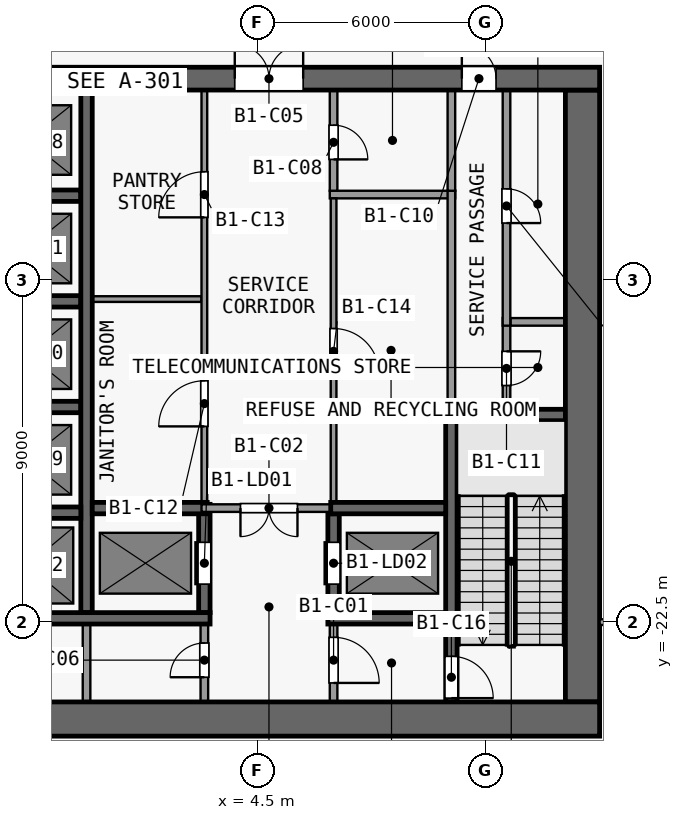
"""IFC4 building model, lengths in metres.
Left out: names, types, materials, properties, quantities, classifications, styles, units other than length and angle.
Written with IfcOpenShell. Run it as: python <this file> out.ifc"""

import sys

from ifc_helpers import new_model, si_unit, direction, frame, frame_2d, origin, place, context, subcontext, project, spatial, rectangle, extrude, element, fill, save


model = new_model("IFC4")
c1 = context("Model", 3, precision=1e-05, world=origin(), true_north=direction((0.0, 1.0)))
c2 = subcontext(c1, "Body", "Model", "MODEL_VIEW")
j1 = project(units=[si_unit("LENGTHUNIT", "METRE"), si_unit("PLANEANGLEUNIT", "RADIAN")], contexts=[c1])
p1 = place(None, origin())
s1 = spatial("IfcSite", under=j1, at=p1, CompositionType="ELEMENT")
p2 = place(p1, origin())
s2 = spatial("IfcBuilding", under=s1, at=p2, CompositionType="ELEMENT")
p3 = place(p2, frame((0.0, 0.0, -5.0)))
s3 = spatial("IfcBuildingStorey", under=s2, at=p3, CompositionType="ELEMENT", Elevation=-5.0)
p4 = place(p3, frame((-13.5, -25.05, 0.0), z_axis=(0.0, 0.0, 1.0), x_axis=(1.0, 0.0, 0.0)))
e1 = element("IfcWall", 1, at=p4, inside=s3, PredefinedType="SHEAR", context=c2, shape_type="SweptSolid", body=[
    extrude(rectangle(XDim=27.0, YDim=0.9, at=frame_2d((13.5, 0.0))), origin(), (0.0, 0.0, 1.0), 4.55),
])
p5 = place(p3, frame((-13.5, -8.2, 0.0), z_axis=(0.0, 0.0, 1.0), x_axis=(1.0, 0.0, 0.0)))
e2 = element("IfcWall", 2, at=p5, inside=s3, PredefinedType="SHEAR", context=c2, shape_type="SweptSolid", body=[
    extrude(rectangle(XDim=27.0, YDim=0.6, at=frame_2d((13.5, 0.0))), origin(), (0.0, 0.0, 1.0), 4.55),
])
p6 = place(p5, frame((7.8, 0.0, 0.0)))
e3 = element("IfcOpeningElement", 3, at=p6, cuts=e2, PredefinedType="OPENING", context=c2, shape_type="SweptSolid", body=[
    extrude(rectangle(XDim=1.8, YDim=2.1, at=frame_2d((0.9, 1.05))), frame((0.0, 0.31, 0.0), z_axis=(0.0, -1.0, 0.0), x_axis=(1.0, 0.0, 0.0)), (0.0, 0.0, 1.0), 0.62),
])
p7 = place(p5, frame((17.4, 0.0, 0.0)))
e4 = element("IfcOpeningElement", 4, at=p7, cuts=e2, PredefinedType="OPENING", context=c2, shape_type="SweptSolid", body=[
    extrude(rectangle(XDim=1.8, YDim=2.1, at=frame_2d((0.9, 1.05))), frame((0.0, 0.31, 0.0), z_axis=(0.0, -1.0, 0.0), x_axis=(1.0, 0.0, 0.0)), (0.0, 0.0, 1.0), 0.62),
])
p8 = place(p5, frame((1.725, 0.0, 0.0)))
e5 = element("IfcOpeningElement", 5, at=p8, cuts=e2, PredefinedType="OPENING", context=c2, shape_type="SweptSolid", body=[
    extrude(rectangle(XDim=1.2, YDim=2.1, at=frame_2d((0.6, 1.05))), frame((0.0, 0.31, 0.0), z_axis=(0.0, -1.0, 0.0), x_axis=(1.0, 0.0, 0.0)), (0.0, 0.0, 1.0), 0.62),
])
p9 = place(p5, frame((23.375, 0.0, 0.0)))
e6 = element("IfcOpeningElement", 6, at=p9, cuts=e2, PredefinedType="OPENING", context=c2, shape_type="SweptSolid", body=[
    extrude(rectangle(XDim=0.9, YDim=2.1, at=frame_2d((0.45, 1.05))), frame((0.0, 0.31, 0.0), z_axis=(0.0, -1.0, 0.0), x_axis=(1.0, 0.0, 0.0)), (0.0, 0.0, 1.0), 0.62),
])
p10 = place(p3, frame((13.05, -24.6, 0.0), z_axis=(0.0, 0.0, 1.0), x_axis=(0.0, 1.0, 0.0)))
e7 = element("IfcWall", 7, at=p10, inside=s3, PredefinedType="SHEAR", context=c2, shape_type="SweptSolid", body=[
    extrude(rectangle(XDim=16.1, YDim=0.9, at=frame_2d((8.05, 0.0))), origin(), (0.0, 0.0, 1.0), 4.55),
])
p11 = place(p3, frame((-2.95, -22.4, 0.0), z_axis=(0.0, 0.0, 1.0), x_axis=(1.0, 0.0, 0.0)))
e8 = element("IfcWall", 8, at=p11, inside=s3, PredefinedType="SHEAR", context=c2, shape_type="SweptSolid", body=[
    extrude(rectangle(XDim=6.2, YDim=0.3, at=frame_2d((3.1, 0.0))), origin(), (0.0, 0.0, 1.0), 4.55),
])
p12 = place(p3, frame((6.35, -22.4, 0.0), z_axis=(0.0, 0.0, 1.0), x_axis=(1.0, 0.0, 0.0)))
e9 = element("IfcWall", 9, at=p12, inside=s3, PredefinedType="SHEAR", context=c2, shape_type="SweptSolid", body=[
    extrude(rectangle(XDim=3.1, YDim=0.3, at=frame_2d((1.55, 0.0))), origin(), (0.0, 0.0, 1.0), 4.55),
])
p13 = place(p3, frame((-2.95, -19.62, 0.0), z_axis=(0.0, 0.0, 1.0), x_axis=(1.0, 0.0, 0.0)))
e10 = element("IfcWall", 10, at=p13, inside=s3, PredefinedType="SHEAR", context=c2, shape_type="SweptSolid", body=[
    extrude(rectangle(XDim=2.8, YDim=0.3, at=frame_2d((1.4, 0.0))), origin(), (0.0, 0.0, 1.0), 4.55),
])
p14 = place(p3, frame((0.15, -19.5, 0.0), z_axis=(0.0, 0.0, 1.0), x_axis=(1.0, 0.0, 0.0)))
e11 = element("IfcWall", 11, at=p14, inside=s3, PredefinedType="SHEAR", context=c2, shape_type="SweptSolid", body=[
    extrude(rectangle(XDim=3.025, YDim=0.3, at=frame_2d((1.513, 0.0))), origin(), (0.0, 0.0, 1.0), 4.55),
])
p15 = place(p3, frame((6.575, -19.5, 0.0), z_axis=(0.0, 0.0, 1.0), x_axis=(-1.0, 0.0, 0.0)))
e12 = element("IfcWall", 12, at=p15, inside=s3, PredefinedType="PARTITIONING", context=c2, shape_type="SweptSolid", body=[
    extrude(rectangle(XDim=3.55, YDim=0.2, at=frame_2d((1.775, 0.0))), origin(), (0.0, 0.0, 1.0), 4.55),
])
p16 = place(p15, frame((1.025, 0.0, 0.0)))
e13 = element("IfcOpeningElement", 13, at=p16, cuts=e12, PredefinedType="OPENING", context=c2, shape_type="SweptSolid", body=[
    extrude(rectangle(XDim=1.5, YDim=2.1, at=frame_2d((0.75, 1.05))), frame((0.0, 0.11, 0.0), z_axis=(0.0, -1.0, 0.0), x_axis=(1.0, 0.0, 0.0)), (0.0, 0.0, 1.0), 0.22),
])
p17 = place(p3, frame((6.425, -19.5, 0.0), z_axis=(0.0, 0.0, 1.0), x_axis=(1.0, 0.0, 0.0)))
e14 = element("IfcWall", 14, at=p17, inside=s3, PredefinedType="SHEAR", context=c2, shape_type="SweptSolid", body=[
    extrude(rectangle(XDim=3.025, YDim=0.3, at=frame_2d((1.512, 0.0))), origin(), (0.0, 0.0, 1.0), 4.55),
])
p18 = place(p3, frame((9.5, -17.05, 0.0), z_axis=(0.0, 0.0, 1.0), x_axis=(1.0, 0.0, 0.0)))
e15 = element("IfcWall", 15, at=p18, inside=s3, PredefinedType="SHEAR", context=c2, shape_type="SweptSolid", body=[
    extrude(rectangle(XDim=3.1, YDim=0.3, at=frame_2d((1.55, 0.0))), origin(), (0.0, 0.0, 1.0), 4.55),
])
p19 = place(p3, frame((-2.95, -16.84, 0.0), z_axis=(0.0, 0.0, 1.0), x_axis=(1.0, 0.0, 0.0)))
e16 = element("IfcWall", 16, at=p19, inside=s3, PredefinedType="SHEAR", context=c2, shape_type="SweptSolid", body=[
    extrude(rectangle(XDim=2.8, YDim=0.3, at=frame_2d((1.4, 0.0))), origin(), (0.0, 0.0, 1.0), 4.55),
])
p20 = place(p3, frame((11.15, -14.6, 0.0), z_axis=(0.0, 0.0, 1.0), x_axis=(1.0, 0.0, 0.0)))
e17 = element("IfcWall", 17, at=p20, inside=s3, PredefinedType="PARTITIONING", context=c2, shape_type="SweptSolid", body=[
    extrude(rectangle(XDim=1.45, YDim=0.2, at=frame_2d((0.725, 0.0))), origin(), (0.0, 0.0, 1.0), 4.55),
])
p21 = place(p3, frame((-2.95, -14.06, 0.0), z_axis=(0.0, 0.0, 1.0), x_axis=(1.0, 0.0, 0.0)))
e18 = element("IfcWall", 18, at=p21, inside=s3, PredefinedType="SHEAR", context=c2, shape_type="SweptSolid", body=[
    extrude(rectangle(XDim=2.8, YDim=0.3, at=frame_2d((1.4, 0.0))), origin(), (0.0, 0.0, 1.0), 4.55),
])
p22 = place(p3, frame((0.15, -14.0, 0.0), z_axis=(0.0, 0.0, 1.0), x_axis=(1.0, 0.0, 0.0)))
e19 = element("IfcWall", 19, at=p22, inside=s3, PredefinedType="PARTITIONING", context=c2, shape_type="SweptSolid", body=[
    extrude(rectangle(XDim=2.875, YDim=0.15, at=frame_2d((1.438, 0.0))), origin(), (0.0, 0.0, 1.0), 4.55),
])
p23 = place(p3, frame((-2.95, -11.28, 0.0), z_axis=(0.0, 0.0, 1.0), x_axis=(1.0, 0.0, 0.0)))
e20 = element("IfcWall", 20, at=p23, inside=s3, PredefinedType="SHEAR", context=c2, shape_type="SweptSolid", body=[
    extrude(rectangle(XDim=2.8, YDim=0.3, at=frame_2d((1.4, 0.0))), origin(), (0.0, 0.0, 1.0), 4.55),
])
p24 = place(p3, frame((6.4, -11.25, 0.0), z_axis=(0.0, 0.0, 1.0), x_axis=(1.0, 0.0, 0.0)))
e21 = element("IfcWall", 21, at=p24, inside=s3, PredefinedType="PARTITIONING", context=c2, shape_type="SweptSolid", body=[
    extrude(rectangle(XDim=3.3, YDim=0.2, at=frame_2d((1.65, 0.0))), origin(), (0.0, 0.0, 1.0), 4.55),
])
p25 = place(p3, frame((0.0, -24.6, 0.0), z_axis=(0.0, 0.0, 1.0), x_axis=(0.0, 1.0, 0.0)))
e22 = element("IfcWall", 22, at=p25, inside=s3, PredefinedType="PARTITIONING", context=c2, shape_type="SweptSolid", body=[
    extrude(rectangle(XDim=2.05, YDim=0.2, at=frame_2d((1.025, 0.0))), origin(), (0.0, 0.0, 1.0), 4.55),
])
p26 = place(p3, frame((0.0, -22.25, 0.0), z_axis=(0.0, 0.0, 1.0), x_axis=(0.0, 1.0, 0.0)))
e23 = element("IfcWall", 23, at=p26, inside=s3, PredefinedType="SHEAR", context=c2, shape_type="SweptSolid", body=[
    extrude(rectangle(XDim=13.75, YDim=0.3, at=frame_2d((6.875, 0.0))), origin(), (0.0, 0.0, 1.0), 4.55),
])
p27 = place(p3, frame((3.1, -24.6, 0.0), z_axis=(0.0, 0.0, 1.0), x_axis=(0.0, 1.0, 0.0)))
e24 = element("IfcWall", 24, at=p27, inside=s3, PredefinedType="PARTITIONING", context=c2, shape_type="SweptSolid", body=[
    extrude(rectangle(XDim=2.05, YDim=0.2, at=frame_2d((1.025, 0.0))), origin(), (0.0, 0.0, 1.0), 4.55),
])
p28 = place(p27, frame((0.65, 0.0, 0.0)))
e25 = element("IfcOpeningElement", 25, at=p28, cuts=e24, PredefinedType="OPENING", context=c2, shape_type="SweptSolid", body=[
    extrude(rectangle(XDim=0.9, YDim=2.1, at=frame_2d((0.45, 1.05))), frame((0.0, 0.11, 0.0), z_axis=(0.0, -1.0, 0.0), x_axis=(1.0, 0.0, 0.0)), (0.0, 0.0, 1.0), 0.22),
])
p29 = place(p3, frame((3.1, -22.25, 0.0), z_axis=(0.0, 0.0, 1.0), x_axis=(0.0, 1.0, 0.0)))
e26 = element("IfcWall", 26, at=p29, inside=s3, PredefinedType="SHEAR", context=c2, shape_type="SweptSolid", body=[
    extrude(rectangle(XDim=2.85, YDim=0.3, at=frame_2d((1.425, 0.0))), origin(), (0.0, 0.0, 1.0), 4.55),
])
p30 = place(p29, frame((0.75, 0.0, 0.0)))
e27 = element("IfcOpeningElement", 27, at=p30, cuts=e26, PredefinedType="OPENING", context=c2, shape_type="SweptSolid", body=[
    extrude(rectangle(XDim=1.1, YDim=2.1, at=frame_2d((0.55, 1.05))), frame((0.0, 0.16, 0.0), z_axis=(0.0, -1.0, 0.0), x_axis=(1.0, 0.0, 0.0)), (0.0, 0.0, 1.0), 0.32),
])
p31 = place(p3, frame((3.1, -19.4, 0.0), z_axis=(0.0, 0.0, 1.0), x_axis=(0.0, 1.0, 0.0)))
e28 = element("IfcWall", 28, at=p31, inside=s3, PredefinedType="PARTITIONING", context=c2, shape_type="SweptSolid", body=[
    extrude(rectangle(XDim=10.9, YDim=0.15, at=frame_2d((5.45, 0.0))), origin(), (0.0, 0.0, 1.0), 4.55),
])
p32 = place(p31, frame((2.05, 0.0, 0.0)))
e29 = element("IfcOpeningElement", 29, at=p32, cuts=e28, PredefinedType="OPENING", context=c2, shape_type="SweptSolid", body=[
    extrude(rectangle(XDim=1.2, YDim=2.1, at=frame_2d((0.6, 1.05))), frame((0.0, 0.085, 0.0), z_axis=(0.0, -1.0, 0.0), x_axis=(1.0, 0.0, 0.0)), (0.0, 0.0, 1.0), 0.17),
])
p33 = place(p31, frame((7.55, 0.0, 0.0)))
e30 = element("IfcOpeningElement", 30, at=p33, cuts=e28, PredefinedType="OPENING", context=c2, shape_type="SweptSolid", body=[
    extrude(rectangle(XDim=1.2, YDim=2.1, at=frame_2d((0.6, 1.05))), frame((0.0, 0.085, 0.0), z_axis=(0.0, -1.0, 0.0), x_axis=(1.0, 0.0, 0.0)), (0.0, 0.0, 1.0), 0.17),
])
p34 = place(p3, frame((6.5, -22.55, 0.0), z_axis=(0.0, 0.0, 1.0), x_axis=(0.0, -1.0, 0.0)))
e31 = element("IfcWall", 31, at=p34, inside=s3, PredefinedType="PARTITIONING", context=c2, shape_type="SweptSolid", body=[
    extrude(rectangle(XDim=2.05, YDim=0.2, at=frame_2d((1.025, 0.0))), origin(), (0.0, 0.0, 1.0), 4.55),
])
p35 = place(p34, frame((0.35, 0.0, 0.0)))
e32 = element("IfcOpeningElement", 32, at=p35, cuts=e31, PredefinedType="OPENING", context=c2, shape_type="SweptSolid", body=[
    extrude(rectangle(XDim=1.2, YDim=2.1, at=frame_2d((0.6, 1.05))), frame((0.0, 0.11, 0.0), z_axis=(0.0, -1.0, 0.0), x_axis=(1.0, 0.0, 0.0)), (0.0, 0.0, 1.0), 0.22),
])
p36 = place(p3, frame((6.5, -22.25, 0.0), z_axis=(0.0, 0.0, 1.0), x_axis=(0.0, 1.0, 0.0)))
e33 = element("IfcWall", 33, at=p36, inside=s3, PredefinedType="SHEAR", context=c2, shape_type="SweptSolid", body=[
    extrude(rectangle(XDim=2.6, YDim=0.3, at=frame_2d((1.3, 0.0))), origin(), (0.0, 0.0, 1.0), 4.55),
])
p37 = place(p36, frame((0.75, 0.0, 0.0)))
e34 = element("IfcOpeningElement", 34, at=p37, cuts=e33, PredefinedType="OPENING", context=c2, shape_type="SweptSolid", body=[
    extrude(rectangle(XDim=1.1, YDim=2.1, at=frame_2d((0.55, 1.05))), frame((0.0, 0.16, 0.0), z_axis=(0.0, -1.0, 0.0), x_axis=(1.0, 0.0, 0.0)), (0.0, 0.0, 1.0), 0.32),
])
p38 = place(p3, frame((6.5, -11.35, 0.0), z_axis=(0.0, 0.0, 1.0), x_axis=(0.0, -1.0, 0.0)))
e35 = element("IfcWall", 35, at=p38, inside=s3, PredefinedType="PARTITIONING", context=c2, shape_type="SweptSolid", body=[
    extrude(rectangle(XDim=8.0, YDim=0.15, at=frame_2d((4.0, 0.0))), origin(), (0.0, 0.0, 1.0), 4.55),
])
p39 = place(p38, frame((3.425, 0.0, 0.0)))
e36 = element("IfcOpeningElement", 36, at=p39, cuts=e35, PredefinedType="OPENING", context=c2, shape_type="SweptSolid", body=[
    extrude(rectangle(XDim=1.2, YDim=2.1, at=frame_2d((0.6, 1.05))), frame((0.0, 0.085, 0.0), z_axis=(0.0, -1.0, 0.0), x_axis=(1.0, 0.0, 0.0)), (0.0, 0.0, 1.0), 0.17),
])
p40 = place(p3, frame((6.5, -8.5, 0.0), z_axis=(0.0, 0.0, 1.0), x_axis=(0.0, -1.0, 0.0)))
e37 = element("IfcWall", 37, at=p40, inside=s3, PredefinedType="PARTITIONING", context=c2, shape_type="SweptSolid", body=[
    extrude(rectangle(XDim=2.65, YDim=0.2, at=frame_2d((1.325, 0.0))), origin(), (0.0, 0.0, 1.0), 4.55),
])
p41 = place(p40, frame((0.925, 0.0, 0.0)))
e38 = element("IfcOpeningElement", 38, at=p41, cuts=e37, PredefinedType="OPENING", context=c2, shape_type="SweptSolid", body=[
    extrude(rectangle(XDim=0.9, YDim=2.1, at=frame_2d((0.45, 1.05))), frame((0.0, 0.11, 0.0), z_axis=(0.0, -1.0, 0.0), x_axis=(1.0, 0.0, 0.0)), (0.0, 0.0, 1.0), 0.22),
])
p42 = place(p3, frame((9.6, -16.9, 0.0), z_axis=(0.0, 0.0, 1.0), x_axis=(0.0, -1.0, 0.0)))
e39 = element("IfcWall", 39, at=p42, inside=s3, PredefinedType="SHEAR", context=c2, shape_type="SweptSolid", body=[
    extrude(rectangle(XDim=7.7, YDim=0.3, at=frame_2d((3.85, 0.0))), origin(), (0.0, 0.0, 1.0), 4.55),
])
p43 = place(p42, frame((6.5, 0.0, 0.0)))
e40 = element("IfcOpeningElement", 40, at=p43, cuts=e39, PredefinedType="OPENING", context=c2, shape_type="SweptSolid", body=[
    extrude(rectangle(XDim=1.1, YDim=2.1, at=frame_2d((0.55, 1.05))), frame((0.0, 0.16, 0.0), z_axis=(0.0, -1.0, 0.0), x_axis=(1.0, 0.0, 0.0)), (0.0, 0.0, 1.0), 0.32),
])
p44 = place(p3, frame((9.6, -16.9, 0.0), z_axis=(0.0, 0.0, 1.0), x_axis=(0.0, 1.0, 0.0)))
e41 = element("IfcWall", 41, at=p44, inside=s3, PredefinedType="PARTITIONING", context=c2, shape_type="SweptSolid", body=[
    extrude(rectangle(XDim=5.75, YDim=0.2, at=frame_2d((2.875, 0.0))), origin(), (0.0, 0.0, 1.0), 4.55),
])
p45 = place(p3, frame((9.6, -11.15, 0.0), z_axis=(0.0, 0.0, 1.0), x_axis=(0.0, 1.0, 0.0)))
e42 = element("IfcWall", 42, at=p45, inside=s3, PredefinedType="PARTITIONING", context=c2, shape_type="SweptSolid", body=[
    extrude(rectangle(XDim=2.65, YDim=0.2, at=frame_2d((1.325, 0.0))), origin(), (0.0, 0.0, 1.0), 4.55),
])
p46 = place(p3, frame((11.05, -14.5, 0.0), z_axis=(0.0, 0.0, 1.0), x_axis=(0.0, -1.0, 0.0)))
e43 = element("IfcWall", 43, at=p46, inside=s3, PredefinedType="PARTITIONING", context=c2, shape_type="SweptSolid", body=[
    extrude(rectangle(XDim=2.4, YDim=0.2, at=frame_2d((1.2, 0.0))), origin(), (0.0, 0.0, 1.0), 4.55),
])
p47 = place(p46, frame((0.875, 0.0, 0.0)))
e44 = element("IfcOpeningElement", 44, at=p47, cuts=e43, PredefinedType="OPENING", context=c2, shape_type="SweptSolid", body=[
    extrude(rectangle(XDim=0.9, YDim=2.1, at=frame_2d((0.45, 1.05))), frame((0.0, 0.11, 0.0), z_axis=(0.0, -1.0, 0.0), x_axis=(1.0, 0.0, 0.0)), (0.0, 0.0, 1.0), 0.22),
])
p48 = place(p3, frame((11.05, -8.5, 0.0), z_axis=(0.0, 0.0, 1.0), x_axis=(0.0, -1.0, 0.0)))
e45 = element("IfcWall", 45, at=p48, inside=s3, PredefinedType="PARTITIONING", context=c2, shape_type="SweptSolid", body=[
    extrude(rectangle(XDim=6.2, YDim=0.2, at=frame_2d((3.1, 0.0))), origin(), (0.0, 0.0, 1.0), 4.55),
])
p49 = place(p48, frame((2.6, 0.0, 0.0)))
e46 = element("IfcOpeningElement", 46, at=p49, cuts=e45, PredefinedType="OPENING", context=c2, shape_type="SweptSolid", body=[
    extrude(rectangle(XDim=0.9, YDim=2.1, at=frame_2d((0.45, 1.05))), frame((0.0, 0.11, 0.0), z_axis=(0.0, -1.0, 0.0), x_axis=(1.0, 0.0, 0.0)), (0.0, 0.0, 1.0), 0.22),
])
p50 = place(p3, frame((13.5, -22.5, 0.0), z_axis=(0.0, 0.0, 1.0), x_axis=(1.0, 0.0, 0.0)))
e47 = element("IfcWall", 47, at=p50, inside=s3, PredefinedType="PARTITIONING", context=c2, shape_type="SweptSolid", body=[
    extrude(rectangle(XDim=2.25, YDim=0.15, at=frame_2d((1.125, 0.0))), origin(), (0.0, 0.0, 1.0), 4.55),
])
p51 = place(p30, origin())
e48 = element("IfcDoor", 48, at=p51, inside=s3, OperationType="DOUBLE_DOOR_SLIDING", PredefinedType="DOOR", context=c2, shape_type="SweptSolid", body=[
    extrude(rectangle(XDim=1.1, YDim=2.1, at=frame_2d((0.55, 1.05))), frame((0.0, 0.025, 0.0), z_axis=(0.0, -1.0, 0.0), x_axis=(1.0, 0.0, 0.0)), (0.0, 0.0, 1.0), 0.05),
])
fill(e27, e48)
p52 = place(p37, origin())
e49 = element("IfcDoor", 49, at=p52, inside=s3, OperationType="DOUBLE_DOOR_SLIDING", PredefinedType="DOOR", context=c2, shape_type="SweptSolid", body=[
    extrude(rectangle(XDim=1.1, YDim=2.1, at=frame_2d((0.55, 1.05))), frame((0.0, 0.025, 0.0), z_axis=(0.0, -1.0, 0.0), x_axis=(1.0, 0.0, 0.0)), (0.0, 0.0, 1.0), 0.05),
])
fill(e34, e49)
p53 = place(p35, origin())
e50 = element("IfcDoor", 50, at=p53, inside=s3, OperationType="SINGLE_SWING_RIGHT", PredefinedType="DOOR", context=c2, shape_type="SweptSolid", body=[
    extrude(rectangle(XDim=1.2, YDim=2.1, at=frame_2d((0.6, 1.05))), frame((0.0, 0.025, 0.0), z_axis=(0.0, -1.0, 0.0), x_axis=(1.0, 0.0, 0.0)), (0.0, 0.0, 1.0), 0.05),
])
fill(e32, e50)
p54 = place(p16, origin())
e51 = element("IfcDoor", 51, at=p54, inside=s3, OperationType="DOUBLE_DOOR_SINGLE_SWING", PredefinedType="DOOR", context=c2, shape_type="SweptSolid", body=[
    extrude(rectangle(XDim=1.5, YDim=2.1, at=frame_2d((0.75, 1.05))), frame((0.0, 0.025, 0.0), z_axis=(0.0, -1.0, 0.0), x_axis=(1.0, 0.0, 0.0)), (0.0, 0.0, 1.0), 0.05),
])
fill(e13, e51)
p55 = place(p7, origin())
e52 = element("IfcDoor", 52, at=p55, inside=s3, OperationType="DOUBLE_DOOR_SINGLE_SWING", PredefinedType="DOOR", context=c2, shape_type="SweptSolid", body=[
    extrude(rectangle(XDim=1.8, YDim=2.1, at=frame_2d((0.9, 1.05))), frame((0.0, 0.025, 0.0), z_axis=(0.0, -1.0, 0.0), x_axis=(1.0, 0.0, 0.0)), (0.0, 0.0, 1.0), 0.05),
])
fill(e4, e52)
p56 = place(p28, origin())
e53 = element("IfcDoor", 53, at=p56, inside=s3, OperationType="SINGLE_SWING_LEFT", PredefinedType="DOOR", context=c2, shape_type="SweptSolid", body=[
    extrude(rectangle(XDim=0.9, YDim=2.1, at=frame_2d((0.45, 1.05))), frame((0.0, 0.025, 0.0), z_axis=(0.0, -1.0, 0.0), x_axis=(1.0, 0.0, 0.0)), (0.0, 0.0, 1.0), 0.05),
])
fill(e25, e53)
p57 = place(p49, origin())
e54 = element("IfcDoor", 54, at=p57, inside=s3, OperationType="SINGLE_SWING_RIGHT", PredefinedType="DOOR", context=c2, shape_type="SweptSolid", body=[
    extrude(rectangle(XDim=0.9, YDim=2.1, at=frame_2d((0.45, 1.05))), frame((0.0, 0.025, 0.0), z_axis=(0.0, -1.0, 0.0), x_axis=(1.0, 0.0, 0.0)), (0.0, 0.0, 1.0), 0.05),
])
fill(e46, e54)
p58 = place(p41, origin())
e55 = element("IfcDoor", 55, at=p58, inside=s3, OperationType="SINGLE_SWING_RIGHT", PredefinedType="DOOR", context=c2, shape_type="SweptSolid", body=[
    extrude(rectangle(XDim=0.9, YDim=2.1, at=frame_2d((0.45, 1.05))), frame((0.0, 0.025, 0.0), z_axis=(0.0, -1.0, 0.0), x_axis=(1.0, 0.0, 0.0)), (0.0, 0.0, 1.0), 0.05),
])
fill(e38, e55)
p59 = place(p9, origin())
e56 = element("IfcDoor", 56, at=p59, inside=s3, OperationType="SINGLE_SWING_LEFT", PredefinedType="DOOR", context=c2, shape_type="SweptSolid", body=[
    extrude(rectangle(XDim=0.9, YDim=2.1, at=frame_2d((0.45, 1.05))), frame((0.0, 0.025, 0.0), z_axis=(0.0, -1.0, 0.0), x_axis=(1.0, 0.0, 0.0)), (0.0, 0.0, 1.0), 0.05),
])
fill(e6, e56)
p60 = place(p47, origin())
e57 = element("IfcDoor", 57, at=p60, inside=s3, OperationType="SINGLE_SWING_LEFT", PredefinedType="DOOR", context=c2, shape_type="SweptSolid", body=[
    extrude(rectangle(XDim=0.9, YDim=2.1, at=frame_2d((0.45, 1.05))), frame((0.0, 0.025, 0.0), z_axis=(0.0, -1.0, 0.0), x_axis=(1.0, 0.0, 0.0)), (0.0, 0.0, 1.0), 0.05),
])
fill(e44, e57)
p61 = place(p32, origin())
e58 = element("IfcDoor", 58, at=p61, inside=s3, OperationType="SINGLE_SWING_LEFT", PredefinedType="DOOR", context=c2, shape_type="SweptSolid", body=[
    extrude(rectangle(XDim=1.2, YDim=2.1, at=frame_2d((0.6, 1.05))), frame((0.0, 0.025, 0.0), z_axis=(0.0, -1.0, 0.0), x_axis=(1.0, 0.0, 0.0)), (0.0, 0.0, 1.0), 0.05),
])
fill(e29, e58)
p62 = place(p33, origin())
e59 = element("IfcDoor", 59, at=p62, inside=s3, OperationType="SINGLE_SWING_LEFT", PredefinedType="DOOR", context=c2, shape_type="SweptSolid", body=[
    extrude(rectangle(XDim=1.2, YDim=2.1, at=frame_2d((0.6, 1.05))), frame((0.0, 0.025, 0.0), z_axis=(0.0, -1.0, 0.0), x_axis=(1.0, 0.0, 0.0)), (0.0, 0.0, 1.0), 0.05),
])
fill(e30, e59)
p63 = place(p39, origin())
e60 = element("IfcDoor", 60, at=p63, inside=s3, OperationType="SINGLE_SWING_RIGHT", PredefinedType="DOOR", context=c2, shape_type="SweptSolid", body=[
    extrude(rectangle(XDim=1.2, YDim=2.1, at=frame_2d((0.6, 1.05))), frame((0.0, 0.025, 0.0), z_axis=(0.0, -1.0, 0.0), x_axis=(1.0, 0.0, 0.0)), (0.0, 0.0, 1.0), 0.05),
])
fill(e36, e60)
p64 = place(p43, origin())
e61 = element("IfcDoor", 61, at=p64, inside=s3, OperationType="SINGLE_SWING_RIGHT", PredefinedType="DOOR", context=c2, shape_type="SweptSolid", body=[
    extrude(rectangle(XDim=1.1, YDim=2.1, at=frame_2d((0.55, 1.05))), frame((0.0, 0.025, 0.0), z_axis=(0.0, -1.0, 0.0), x_axis=(1.0, 0.0, 0.0)), (0.0, 0.0, 1.0), 0.05),
])
fill(e40, e61)
save(model, sys.argv[1])
